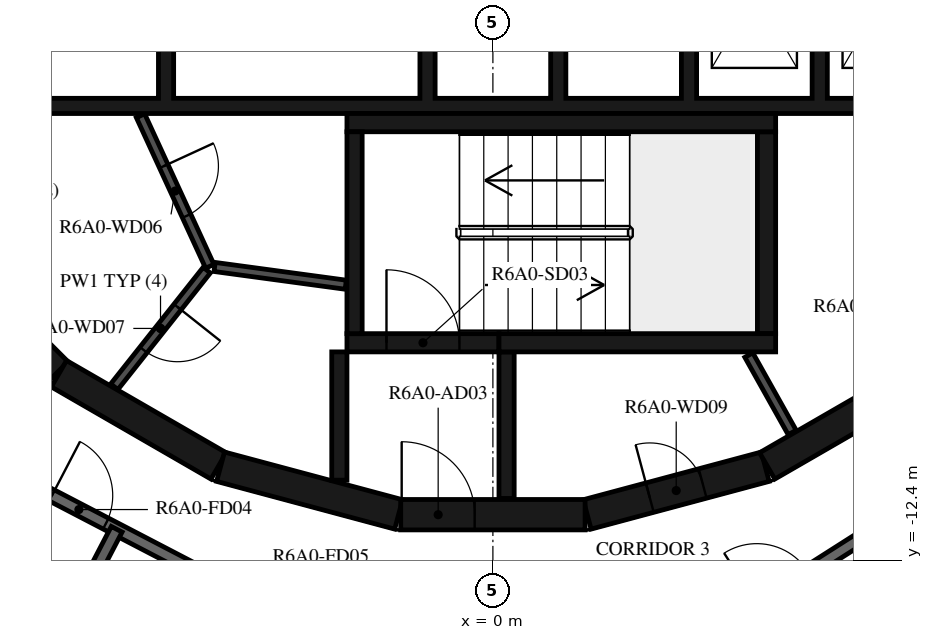
"""IFC4 building model, lengths in metres.
Left out: names, types, materials, properties, quantities, classifications, styles, units other than length and angle.
Written with IfcOpenShell. Run it as: python <this file> out.ifc"""

import sys

from ifc_helpers import new_model, si_unit, direction, frame, frame_2d, origin, place, context, subcontext, project, spatial, polyline, rectangle, outline, extrude, element, fill, save


model = new_model("IFC4")
c1 = context("Model", 3, precision=1e-05, world=origin(), true_north=direction((0.0, 1.0)))
c2 = subcontext(c1, "Body", "Model", "MODEL_VIEW")
j1 = project(units=[si_unit("LENGTHUNIT", "METRE"), si_unit("PLANEANGLEUNIT", "RADIAN")], contexts=[c1])
p1 = place(None, origin())
s1 = spatial("IfcSite", under=j1, at=p1, CompositionType="ELEMENT")
p2 = place(p1, origin())
s2 = spatial("IfcBuilding", under=s1, at=p2, CompositionType="ELEMENT")
p3 = place(p2, frame((0.0, 0.0, 233.7)))
s3 = spatial("IfcBuildingStorey", under=s2, at=p3, CompositionType="ELEMENT", Elevation=233.7)
p4 = place(p3, frame((1.55, -11.643, 0.0), z_axis=(0.0, 0.0, 1.0), x_axis=(0.965948410781, 0.258734743916, 0.0)))
e1 = element("IfcWall", 1, at=p4, inside=s3, PredefinedType="SHEAR", context=c2, shape_type="SweptSolid", body=[
    extrude(rectangle(XDim=3.033, YDim=0.5, at=frame_2d((1.516, 0.0))), origin(), (0.0, 0.0, 1.0), 3.12),
])
p5 = place(p4, frame((1.066, 0.0, 0.0)))
e2 = element("IfcOpeningElement", 2, at=p5, cuts=e1, PredefinedType="OPENING", context=c2, shape_type="SweptSolid", body=[
    extrude(rectangle(XDim=0.9, YDim=2.1, at=frame_2d((0.45, 1.05))), frame((0.0, 0.26, 0.0), z_axis=(0.0, -1.0, 0.0), x_axis=(1.0, 0.0, 0.0)), (0.0, 0.0, 1.0), 0.52),
])
p6 = place(p3, frame((4.51, -10.845, 0.0), z_axis=(0.0, 0.0, 1.0), x_axis=(0.865975092491, 0.500087131594, 0.0)))
e3 = element("IfcWall", 3, at=p6, inside=s3, PredefinedType="SHEAR", context=c2, shape_type="SweptSolid", body=[
    extrude(rectangle(XDim=3.033, YDim=0.5, at=frame_2d((1.516, 0.0))), origin(), (0.0, 0.0, 1.0), 3.12),
])
p7 = place(p3, frame((-9.308, -7.164, 0.0), z_axis=(0.0, 0.0, 1.0), x_axis=(0.707106781187, -0.707106781187, 0.0)))
e4 = element("IfcWall", 4, at=p7, inside=s3, PredefinedType="SHEAR", context=c2, shape_type="SweptSolid", body=[
    extrude(rectangle(XDim=3.032, YDim=0.5, at=frame_2d((1.516, 0.0))), origin(), (0.0, 0.0, 1.0), 3.12),
])
for number, where, z_axis, x_axis in (
    (5, (-7.137, -9.329, 0.0), (0.0, 0.0, 1.0), (0.866, -0.5, 0.0)),
    (6, (-4.479, -10.858, 0.0), (0.0, 0.0, 1.0), (0.966, -0.259, 0.0)),
):
    element("IfcWall", number, at=place(p3, frame(where, z_axis=z_axis, x_axis=x_axis)), inside=s3, PredefinedType="SHEAR", context=c2, shape_type="SweptSolid", body=[
        extrude(rectangle(XDim=3.033, YDim=0.5, at=frame_2d((1.516, 0.0))), origin(), (0.0, 0.0, 1.0), 3.12),
    ])
p8 = place(p3, frame((-1.516, -11.647, 0.0), z_axis=(0.0, 0.0, 1.0), x_axis=(1.0, 0.0, 0.0)))
e7 = element("IfcWall", 7, at=p8, inside=s3, PredefinedType="SHEAR", context=c2, shape_type="SweptSolid", body=[
    extrude(rectangle(XDim=3.033, YDim=0.5, at=frame_2d((1.516, 0.0))), origin(), (0.0, 0.0, 1.0), 3.12),
])
p9 = place(p8, frame((0.016, 0.0, 0.0)))
e8 = element("IfcOpeningElement", 8, at=p9, cuts=e7, PredefinedType="OPENING", context=c2, shape_type="SweptSolid", body=[
    extrude(rectangle(XDim=1.2, YDim=2.1, at=frame_2d((0.6, 1.05))), frame((0.0, 0.26, 0.0), z_axis=(0.0, -1.0, 0.0), x_axis=(1.0, 0.0, 0.0)), (0.0, 0.0, 1.0), 0.52),
])
p10 = place(p3, frame((-2.275, -8.67, 0.0), z_axis=(0.0, 0.0, 1.0), x_axis=(0.0, 1.0, 0.0)))
e9 = element("IfcWall", 9, at=p10, inside=s3, PredefinedType="SHEAR", context=c2, shape_type="SweptSolid", body=[
    extrude(rectangle(XDim=3.32, YDim=0.25, at=frame_2d((1.66, 0.0))), origin(), (0.0, 0.0, 1.0), 3.12),
])
p11 = place(p3, frame((-2.4, -5.2, 0.0), z_axis=(0.0, 0.0, 1.0), x_axis=(1.0, 0.0, 0.0)))
e10 = element("IfcWall", 10, at=p11, inside=s3, PredefinedType="SHEAR", context=c2, shape_type="SweptSolid", body=[
    extrude(rectangle(XDim=7.05, YDim=0.3, at=frame_2d((3.525, 0.0))), origin(), (0.0, 0.0, 1.0), 3.12),
])
p12 = place(p3, frame((4.5, -8.67, 0.0), z_axis=(0.0, 0.0, 1.0), x_axis=(0.0, 1.0, 0.0)))
e11 = element("IfcWall", 11, at=p12, inside=s3, PredefinedType="SHEAR", context=c2, shape_type="SweptSolid", body=[
    extrude(rectangle(XDim=3.32, YDim=0.3, at=frame_2d((1.66, 0.0))), origin(), (0.0, 0.0, 1.0), 3.12),
])
p13 = place(p3, frame((0.1, -8.82, 0.0), z_axis=(0.0, 0.0, 1.0), x_axis=(1.0, 0.0, 0.0)))
e12 = element("IfcWall", 12, at=p13, inside=s3, PredefinedType="SHEAR", context=c2, shape_type="SweptSolid", body=[
    extrude(rectangle(XDim=4.55, YDim=0.3, at=frame_2d((2.275, 0.0))), origin(), (0.0, 0.0, 1.0), 3.12),
])
p14 = place(p3, frame((-2.4, -8.82, 0.0), z_axis=(0.0, 0.0, 1.0), x_axis=(1.0, 0.0, 0.0)))
e13 = element("IfcWall", 13, at=p14, inside=s3, PredefinedType="SHEAR", context=c2, shape_type="SweptSolid", body=[
    extrude(rectangle(XDim=2.5, YDim=0.3, at=frame_2d((1.25, 0.0))), origin(), (0.0, 0.0, 1.0), 3.12),
])
p15 = place(p14, frame((0.65, 0.0, 0.0)))
e14 = element("IfcOpeningElement", 14, at=p15, cuts=e13, PredefinedType="OPENING", context=c2, shape_type="SweptSolid", body=[
    extrude(rectangle(XDim=1.2, YDim=2.1, at=frame_2d((0.6, 1.05))), frame((0.0, 0.16, 0.0), z_axis=(0.0, -1.0, 0.0), x_axis=(1.0, 0.0, 0.0)), (0.0, 0.0, 1.0), 0.32),
])
p16 = place(p3, frame((-2.525, -8.97, 0.0), z_axis=(0.0, 0.0, 1.0), x_axis=(0.0, -1.0, 0.0)))
e15 = element("IfcWall", 15, at=p16, inside=s3, PredefinedType="SHEAR", context=c2, shape_type="SweptSolid", body=[
    extrude(rectangle(XDim=2.11, YDim=0.25, at=frame_2d((1.055, 0.0))), origin(), (0.0, 0.0, 1.0), 3.12),
])
p17 = place(p3, frame((0.225, -8.97, 0.0), z_axis=(0.0, 0.0, 1.0), x_axis=(0.0, -1.0, 0.0)))
e16 = element("IfcWall", 16, at=p17, inside=s3, PredefinedType="SHEAR", context=c2, shape_type="SweptSolid", body=[
    extrude(rectangle(XDim=2.41, YDim=0.25, at=frame_2d((1.205, 0.0))), origin(), (0.0, 0.0, 1.0), 3.12),
])
p18 = place(p3, origin())
e17 = element("IfcWall", 17, at=p18, inside=s3, PredefinedType="SHEAR", context=c2, shape_type="SweptSolid", body=[
    extrude(outline(polyline([(9.8, -5.05), (9.8, -4.8), (9.8, -1.9), (9.55, -1.9), (9.55, -4.8), (7.65, -4.8), (7.65, -1.9), (7.4, -1.9), (7.4, -4.8), (5.5, -4.8), (5.5, -1.9), (5.25, -1.9), (5.25, -4.8), (3.35, -4.8), (3.35, -1.9), (3.1, -1.9), (3.1, -4.8), (1.2, -4.8), (1.2, -1.9), (0.95, -1.9), (0.95, -4.8), (-0.95, -4.8), (-0.95, -1.9), (-1.2, -1.9), (-1.2, -4.8), (-5.25, -4.8), (-5.25, -1.9), (-5.5, -1.9), (-5.5, -4.8), (-7.4, -4.8), (-7.4, -1.9), (-7.65, -1.9), (-7.65, -4.8), (-9.55, -4.8), (-9.55, -1.9), (-9.8, -1.9), (-9.8, -4.8), (-9.8, -5.05), (9.8, -5.05)])), origin(), (0.0, 0.0, 1.0), 3.12),
])
p19 = place(p3, frame((4.922, -10.296, 0.0), z_axis=(0.0, 0.0, 1.0), x_axis=(-0.48860846254, 0.872503163509, 0.0)))
e18 = element("IfcWall", 18, at=p19, inside=s3, PredefinedType="PARTITIONING", context=c2, shape_type="SweptSolid", body=[
    extrude(rectangle(XDim=1.459, YDim=0.15, at=frame_2d((0.73, 0.0))), origin(), (0.0, 0.0, 1.0), 3.12),
])
p20 = place(p3, frame((-5.795, -5.086, 0.0), z_axis=(0.0, 0.0, 1.0), x_axis=(0.417887867606, -0.908498613157, 0.0)))
e19 = element("IfcWall", 19, at=p20, inside=s3, PredefinedType="PARTITIONING", context=c2, shape_type="SweptSolid", body=[
    extrude(rectangle(XDim=2.726, YDim=0.15, at=frame_2d((1.363, 0.0))), origin(), (0.0, 0.0, 1.0), 3.12),
])
p21 = place(p20, frame((0.913, 0.0, 0.0)))
e20 = element("IfcOpeningElement", 20, at=p21, cuts=e19, PredefinedType="OPENING", context=c2, shape_type="SweptSolid", body=[
    extrude(rectangle(XDim=0.9, YDim=2.1, at=frame_2d((0.45, 1.05))), frame((0.0, 0.085, 0.0), z_axis=(0.0, -1.0, 0.0), x_axis=(1.0, 0.0, 0.0)), (0.0, 0.0, 1.0), 0.17),
])
p22 = place(p3, frame((-4.706, -7.625, 0.0), z_axis=(0.0, 0.0, 1.0), x_axis=(-0.621392599334, -0.783499353856, 0.0)))
e21 = element("IfcWall", 21, at=p22, inside=s3, PredefinedType="PARTITIONING", context=c2, shape_type="SweptSolid", body=[
    extrude(rectangle(XDim=2.447, YDim=0.15, at=frame_2d((1.224, 0.0))), origin(), (0.0, 0.0, 1.0), 3.12),
])
p23 = place(p22, frame((0.774, 0.0, 0.0)))
e22 = element("IfcOpeningElement", 22, at=p23, cuts=e21, PredefinedType="OPENING", context=c2, shape_type="SweptSolid", body=[
    extrude(rectangle(XDim=0.9, YDim=2.1, at=frame_2d((0.45, 1.05))), frame((0.0, 0.085, 0.0), z_axis=(0.0, -1.0, 0.0), x_axis=(1.0, 0.0, 0.0)), (0.0, 0.0, 1.0), 0.17),
])
p24 = place(p3, frame((-2.42, -7.865, 0.0), z_axis=(0.0, 0.0, 1.0), x_axis=(-0.990972299108, 0.134066783362, 0.0)))
e23 = element("IfcWall", 23, at=p24, inside=s3, PredefinedType="PARTITIONING", context=c2, shape_type="SweptSolid", body=[
    extrude(rectangle(XDim=2.176, YDim=0.15, at=frame_2d((1.088, 0.0))), origin(), (0.0, 0.0, 1.0), 3.12),
])
p25 = place(p3, frame((-9.372, -10.228, 0.0), z_axis=(0.0, 0.0, 1.0), x_axis=(0.887005184532, -0.461759464021, 0.0)))
e24 = element("IfcWall", 24, at=p25, inside=s3, PredefinedType="STANDARD", context=c2, shape_type="SweptSolid", body=[
    extrude(rectangle(XDim=7.181, YDim=0.2, at=frame_2d((3.591, 0.0))), origin(), (0.0, 0.0, 1.0), 3.12),
])
p26 = place(p25, frame((2.391, 0.0, 0.0)))
e25 = element("IfcOpeningElement", 25, at=p26, cuts=e24, PredefinedType="OPENING", context=c2, shape_type="SweptSolid", body=[
    extrude(rectangle(XDim=1.0, YDim=2.1, at=frame_2d((0.5, 1.05))), frame((0.0, 0.11, 0.0), z_axis=(0.0, -1.0, 0.0), x_axis=(1.0, 0.0, 0.0)), (0.0, 0.0, 1.0), 0.22),
])
p27 = place(p3, frame((4.172, -13.231, 0.0), z_axis=(0.0, 0.0, 1.0), x_axis=(0.843388394728, 0.537304397561, 0.0)))
e26 = element("IfcWall", 26, at=p27, inside=s3, PredefinedType="STANDARD", context=c2, shape_type="SweptSolid", body=[
    extrude(rectangle(XDim=7.181, YDim=0.2, at=frame_2d((3.59, 0.0))), origin(), (0.0, 0.0, 1.0), 3.12),
])
p28 = place(p27, frame((0.2, 0.0, 0.0)))
e27 = element("IfcOpeningElement", 27, at=p28, cuts=e26, PredefinedType="OPENING", context=c2, shape_type="SweptSolid", body=[
    extrude(rectangle(XDim=1.0, YDim=2.1, at=frame_2d((0.5, 1.05))), frame((0.0, 0.11, 0.0), z_axis=(0.0, -1.0, 0.0), x_axis=(1.0, 0.0, 0.0)), (0.0, 0.0, 1.0), 0.22),
])
p29 = place(p3, frame((-8.326, -15.996, 0.0), z_axis=(0.0, 0.0, 1.0), x_axis=(0.461739255077, 0.887015704664, 0.0)))
e28 = element("IfcWall", 28, at=p29, inside=s3, PredefinedType="STANDARD", context=c2, shape_type="SweptSolid", body=[
    extrude(rectangle(XDim=4.633, YDim=0.2, at=frame_2d((2.317, 0.0))), origin(), (0.0, 0.0, 1.0), 3.12),
])
p30 = place(p3, frame((-10.421, -11.373, 0.0), z_axis=(0.0, 0.0, 1.0), x_axis=(0.887006451745, -0.461757029792, 0.0)))
e29 = element("IfcWall", 29, at=p30, inside=s3, PredefinedType="PARTITIONING", context=c2, shape_type="SweptSolid", body=[
    extrude(rectangle(XDim=3.992, YDim=0.12, at=frame_2d((1.996, 0.0))), origin(), (0.0, 0.0, 1.0), 3.12),
])
p31 = place(p30, frame((0.639, 0.0, 0.0)))
e30 = element("IfcOpeningElement", 30, at=p31, cuts=e29, PredefinedType="OPENING", context=c2, shape_type="SweptSolid", body=[
    extrude(rectangle(XDim=0.9, YDim=2.1, at=frame_2d((0.45, 1.05))), frame((0.0, 0.07, 0.0), z_axis=(0.0, -1.0, 0.0), x_axis=(1.0, 0.0, 0.0)), (0.0, 0.0, 1.0), 0.14),
])
p32 = place(p3, frame((4.83, -14.59, 0.0), z_axis=(0.0, 0.0, 1.0), x_axis=(0.843393042763, 0.537297101629, 0.0)))
e31 = element("IfcWall", 31, at=p32, inside=s3, PredefinedType="PARTITIONING", context=c2, shape_type="SweptSolid", body=[
    extrude(rectangle(XDim=7.53, YDim=0.12, at=frame_2d((3.765, 0.0))), origin(), (0.0, 0.0, 1.0), 3.12),
])
p33 = place(p32, frame((0.2, 0.0, 0.0)))
e32 = element("IfcOpeningElement", 32, at=p33, cuts=e31, PredefinedType="OPENING", context=c2, shape_type="SweptSolid", body=[
    extrude(rectangle(XDim=0.9, YDim=2.1, at=frame_2d((0.45, 1.05))), frame((0.0, 0.07, 0.0), z_axis=(0.0, -1.0, 0.0), x_axis=(1.0, 0.0, 0.0)), (0.0, 0.0, 1.0), 0.14),
])
p34 = place(p15, origin())
e33 = element("IfcDoor", 33, at=p34, inside=s3, OperationType="SINGLE_SWING_LEFT", PredefinedType="DOOR", context=c2, shape_type="SweptSolid", body=[
    extrude(rectangle(XDim=1.2, YDim=2.1, at=frame_2d((0.6, 1.05))), frame((0.0, 0.025, 0.0), z_axis=(0.0, -1.0, 0.0), x_axis=(1.0, 0.0, 0.0)), (0.0, 0.0, 1.0), 0.05),
])
fill(e14, e33)
p35 = place(p9, origin())
e34 = element("IfcDoor", 34, at=p35, inside=s3, OperationType="SINGLE_SWING_RIGHT", PredefinedType="DOOR", context=c2, shape_type="SweptSolid", body=[
    extrude(rectangle(XDim=1.2, YDim=2.1, at=frame_2d((0.6, 1.05))), frame((0.0, 0.025, 0.0), z_axis=(0.0, -1.0, 0.0), x_axis=(1.0, 0.0, 0.0)), (0.0, 0.0, 1.0), 0.05),
])
fill(e8, e34)
p36 = place(p21, origin())
e35 = element("IfcDoor", 35, at=p36, inside=s3, OperationType="SINGLE_SWING_RIGHT", PredefinedType="DOOR", context=c2, shape_type="SweptSolid", body=[
    extrude(rectangle(XDim=0.9, YDim=2.1, at=frame_2d((0.45, 1.05))), frame((0.0, 0.025, 0.0), z_axis=(0.0, -1.0, 0.0), x_axis=(1.0, 0.0, 0.0)), (0.0, 0.0, 1.0), 0.05),
])
fill(e20, e35)
p37 = place(p23, origin())
e36 = element("IfcDoor", 36, at=p37, inside=s3, OperationType="SINGLE_SWING_LEFT", PredefinedType="DOOR", context=c2, shape_type="SweptSolid", body=[
    extrude(rectangle(XDim=0.9, YDim=2.1, at=frame_2d((0.45, 1.05))), frame((0.0, 0.025, 0.0), z_axis=(0.0, -1.0, 0.0), x_axis=(1.0, 0.0, 0.0)), (0.0, 0.0, 1.0), 0.05),
])
fill(e22, e36)
p38 = place(p5, origin())
e37 = element("IfcDoor", 37, at=p38, inside=s3, OperationType="SINGLE_SWING_LEFT", PredefinedType="DOOR", context=c2, shape_type="SweptSolid", body=[
    extrude(rectangle(XDim=0.9, YDim=2.1, at=frame_2d((0.45, 1.05))), frame((0.0, 0.025, 0.0), z_axis=(0.0, -1.0, 0.0), x_axis=(1.0, 0.0, 0.0)), (0.0, 0.0, 1.0), 0.05),
])
fill(e2, e37)
p39 = place(p26, origin())
e38 = element("IfcDoor", 38, at=p39, inside=s3, OperationType="SINGLE_SWING_RIGHT", PredefinedType="DOOR", context=c2, shape_type="SweptSolid", body=[
    extrude(rectangle(XDim=1.0, YDim=2.1, at=frame_2d((0.5, 1.05))), frame((0.0, 0.025, 0.0), z_axis=(0.0, -1.0, 0.0), x_axis=(1.0, 0.0, 0.0)), (0.0, 0.0, 1.0), 0.05),
])
fill(e25, e38)
save(model, sys.argv[1])
